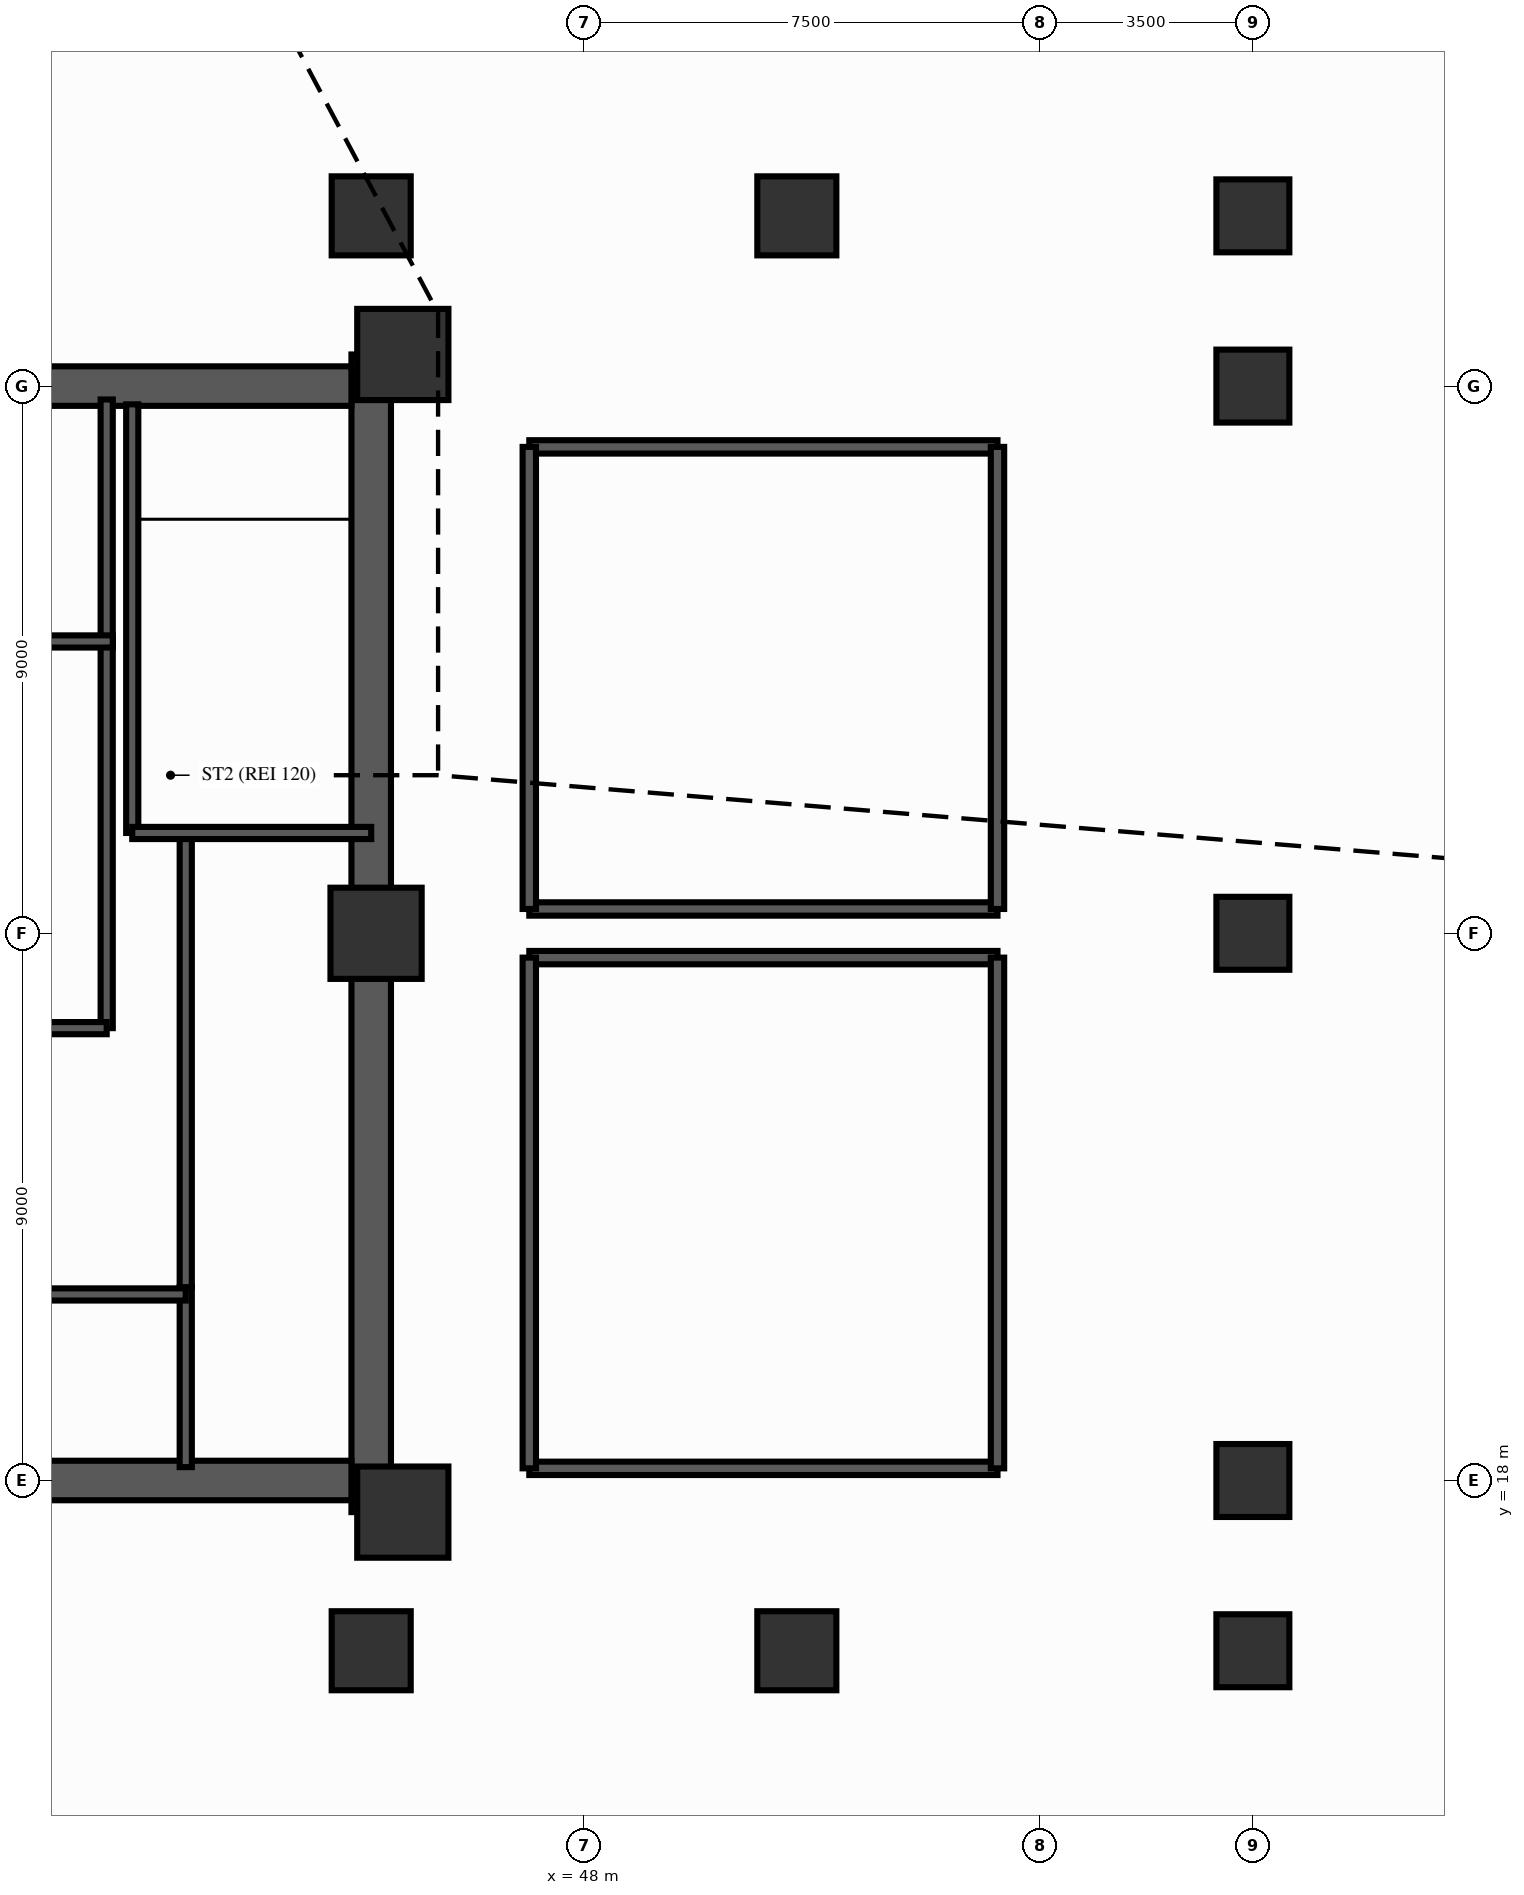
"""IFC4 building model, lengths in metres.
Left out: names, types, materials, properties, quantities, classifications, styles, units other than length and angle.
Written with IfcOpenShell. Run it as: python <this file> out.ifc"""

import sys

from ifc_helpers import new_model, si_unit, direction, frame, frame_2d, origin, origin_2d, place, context, subcontext, project, spatial, rectangle, extrude, source, transform, mapped, element, fill, save


model = new_model("IFC4")
c1 = context("Model", 3, precision=1e-05, world=origin(), true_north=direction((0.0, 1.0)))
c2 = subcontext(c1, "Body", "Model", "MODEL_VIEW")
j1 = project(units=[si_unit("LENGTHUNIT", "METRE"), si_unit("PLANEANGLEUNIT", "RADIAN")], contexts=[c1])
p1 = place(None, origin())
s1 = spatial("IfcSite", under=j1, at=p1, CompositionType="ELEMENT")
p2 = place(p1, origin())
s2 = spatial("IfcBuilding", under=s1, at=p2, CompositionType="ELEMENT")
p3 = place(p2, frame((0.0, 0.0, -9.2)))
s3 = spatial("IfcBuildingStorey", under=s2, at=p3, CompositionType="ELEMENT", Elevation=-9.2)
p4 = place(p3, frame((44.5, 17.48, 0.0), z_axis=(0.0, 0.0, 1.0), x_axis=(0.0, 1.0, 0.0)))
e1 = element("IfcWall", 1, at=p4, inside=s3, PredefinedType="SHEAR", context=c2, shape_type="SweptSolid", body=[
    extrude(rectangle(XDim=19.04, YDim=0.65, at=frame_2d((9.52, 0.0))), origin(), (0.0, 0.0, 1.0), 4.6),
])
p5 = place(p4, frame((12.67, 0.0, 0.0), z_axis=(0.0, 0.0, 1.0), x_axis=(-1.0, 0.0, 0.0)))
e2 = element("IfcOpeningElement", 2, at=p5, cuts=e1, PredefinedType="OPENING", context=c2, shape_type="SweptSolid", body=[
    extrude(rectangle(XDim=1.1, YDim=2.15, at=frame_2d((0.55, 1.075))), frame((0.0, 0.337, 0.0), z_axis=(0.0, -1.0, 0.0), x_axis=(1.0, 0.0, 0.0)), (0.0, 0.0, 1.0), 0.674),
])
p6 = place(p3, frame((31.825, 18.0, 0.0), z_axis=(0.0, 0.0, 1.0), x_axis=(1.0, 0.0, 0.0)))
e3 = element("IfcWall", 3, at=p6, inside=s3, PredefinedType="SHEAR", context=c2, shape_type="SweptSolid", body=[
    extrude(rectangle(XDim=12.35, YDim=0.65, at=frame_2d((6.175, 0.0))), origin(), (0.0, 0.0, 1.0), 4.6),
])
p7 = place(p3, frame((31.825, 36.0, 0.0), z_axis=(0.0, 0.0, 1.0), x_axis=(1.0, 0.0, 0.0)))
e4 = element("IfcWall", 4, at=p7, inside=s3, PredefinedType="SHEAR", context=c2, shape_type="SweptSolid", body=[
    extrude(rectangle(XDim=12.35, YDim=0.65, at=frame_2d((6.175, 0.0))), origin(), (0.0, 0.0, 1.0), 4.6),
])
p8 = place(p7, frame((5.125, 0.0, 0.0), z_axis=(0.0, 0.0, 1.0), x_axis=(-1.0, 0.0, 0.0)))
e5 = element("IfcOpeningElement", 5, at=p8, cuts=e4, PredefinedType="OPENING", context=c2, shape_type="SweptSolid", body=[
    extrude(rectangle(XDim=1.4, YDim=2.15, at=frame_2d((0.7, 1.075))), frame((0.0, 0.337, 0.0), z_axis=(0.0, -1.0, 0.0), x_axis=(1.0, 0.0, 0.0)), (0.0, 0.0, 1.0), 0.674),
])
m1 = source(origin(), c2, "Body", "SweptSolid", [
    extrude(rectangle(XDim=1.5, YDim=1.5, at=origin_2d()), origin(), (0.0, 0.0, 1.0), 4.6),
])
for number, where, z_axis, x_axis in (
    (6, (45.02, 17.48, 0.0), (0.0, 0.0, 1.0), (1.0, 0.0, 0.0)),
    (7, (45.02, 36.52, 0.0), (0.0, 0.0, 1.0), (1.0, 0.0, 0.0)),
    (8, (44.58, 27.0, 0.0), (0.0, 0.0, 1.0), (1.0, 0.0, 0.0)),
):
    element("IfcColumn", number, at=place(p3, frame(where, z_axis=z_axis, x_axis=x_axis)), inside=s3, PredefinedType="COLUMN", context=c2, shape_type="MappedRepresentation", body=[
        mapped(m1, transform((0.0, 0.0, 0.0), scale=1.0)),
    ])
m2 = source(origin(), c2, "Body", "SweptSolid", [
    extrude(rectangle(XDim=1.2, YDim=1.2, at=origin_2d()), origin(), (0.0, 0.0, 1.0), 4.6),
])
for number, where, z_axis, x_axis in (
    (9, (59.0, 15.2, 0.0), (0.0, 0.0, 1.0), (1.0, 0.0, 0.0)),
    (10, (59.0, 18.0, 0.0), (0.0, 0.0, 1.0), (1.0, 0.0, 0.0)),
    (11, (59.0, 27.0, 0.0), (0.0, 0.0, 1.0), (1.0, 0.0, 0.0)),
    (12, (59.0, 36.0, 0.0), (0.0, 0.0, 1.0), (1.0, 0.0, 0.0)),
    (13, (59.0, 38.8, 0.0), (0.0, 0.0, 1.0), (1.0, 0.0, 0.0)),
):
    element("IfcColumn", number, at=place(p3, frame(where, z_axis=z_axis, x_axis=x_axis)), inside=s3, PredefinedType="COLUMN", context=c2, shape_type="MappedRepresentation", body=[
        mapped(m2, transform((0.0, 0.0, 0.0), scale=1.0)),
    ])
m3 = source(origin(), c2, "Body", "SweptSolid", [
    extrude(rectangle(XDim=1.3, YDim=1.3, at=origin_2d()), origin(), (0.0, 0.0, 1.0), 4.6),
])
for number, where, z_axis, x_axis in (
    (14, (44.5, 15.2, 0.0), (0.0, 0.0, 1.0), (1.0, 0.0, 0.0)),
    (15, (44.5, 38.8, 0.0), (0.0, 0.0, 1.0), (1.0, 0.0, 0.0)),
    (16, (51.5, 15.2, 0.0), (0.0, 0.0, 1.0), (1.0, 0.0, 0.0)),
    (17, (51.5, 38.8, 0.0), (0.0, 0.0, 1.0), (1.0, 0.0, 0.0)),
):
    element("IfcColumn", number, at=place(p3, frame(where, z_axis=z_axis, x_axis=x_axis)), inside=s3, PredefinedType="COLUMN", context=c2, shape_type="MappedRepresentation", body=[
        mapped(m3, transform((0.0, 0.0, 0.0), scale=1.0)),
    ])
p9 = place(p3, frame((41.45, 18.22, 0.0), z_axis=(0.0, 0.0, 1.0), x_axis=(0.0, 1.0, 0.0)))
e18 = element("IfcWall", 18, at=p9, inside=s3, PredefinedType="PARTITIONING", context=c2, shape_type="SweptSolid", body=[
    extrude(rectangle(XDim=2.96, YDim=0.2, at=frame_2d((1.48, 0.0))), origin(), (0.0, 0.0, 1.0), 4.3),
])
p10 = place(p3, frame((41.45, 21.18, 0.0), z_axis=(0.0, 0.0, 1.0), x_axis=(0.0, 1.0, 0.0)))
e19 = element("IfcWall", 19, at=p10, inside=s3, PredefinedType="PARTITIONING", context=c2, shape_type="SweptSolid", body=[
    extrude(rectangle(XDim=7.42, YDim=0.2, at=frame_2d((3.71, 0.0))), origin(), (0.0, 0.0, 1.0), 4.3),
])
p11 = place(p10, frame((2.6, 0.0, 0.0)))
e20 = element("IfcOpeningElement", 20, at=p11, cuts=e19, PredefinedType="OPENING", context=c2, shape_type="SweptSolid", body=[
    extrude(rectangle(XDim=0.9, YDim=2.1, at=frame_2d((0.45, 1.05))), frame((0.0, 0.112, 0.0), z_axis=(0.0, -1.0, 0.0), x_axis=(1.0, 0.0, 0.0)), (0.0, 0.0, 1.0), 0.224),
])
p12 = place(p3, frame((40.15, 25.44, 0.0), z_axis=(0.0, 0.0, 1.0), x_axis=(0.0, 1.0, 0.0)))
e21 = element("IfcWall", 21, at=p12, inside=s3, PredefinedType="PARTITIONING", context=c2, shape_type="SweptSolid", body=[
    extrude(rectangle(XDim=6.36, YDim=0.2, at=frame_2d((3.18, 0.0))), origin(), (0.0, 0.0, 1.0), 4.3),
])
p13 = place(p3, frame((40.15, 31.8, 0.0), z_axis=(0.0, 0.0, 1.0), x_axis=(0.0, 1.0, 0.0)))
e22 = element("IfcWall", 22, at=p13, inside=s3, PredefinedType="PARTITIONING", context=c2, shape_type="SweptSolid", body=[
    extrude(rectangle(XDim=3.98, YDim=0.2, at=frame_2d((1.99, 0.0))), origin(), (0.0, 0.0, 1.0), 4.3),
])
p14 = place(p3, frame((35.43, 21.06, 0.0), z_axis=(0.0, 0.0, 1.0), x_axis=(1.0, 0.0, 0.0)))
e23 = element("IfcWall", 23, at=p14, inside=s3, PredefinedType="PARTITIONING", context=c2, shape_type="SweptSolid", body=[
    extrude(rectangle(XDim=6.02, YDim=0.2, at=frame_2d((3.01, 0.0))), origin(), (0.0, 0.0, 1.0), 4.3),
])
p15 = place(p14, frame((1.0, 0.0, 0.0)))
e24 = element("IfcOpeningElement", 24, at=p15, cuts=e23, PredefinedType="OPENING", context=c2, shape_type="SweptSolid", body=[
    extrude(rectangle(XDim=1.1, YDim=2.15, at=frame_2d((0.55, 1.075))), frame((0.0, 0.112, 0.0), z_axis=(0.0, -1.0, 0.0), x_axis=(1.0, 0.0, 0.0)), (0.0, 0.0, 1.0), 0.224),
])
p16 = place(p14, frame((2.95, 0.0, 0.0)))
e25 = element("IfcOpeningElement", 25, at=p16, cuts=e23, PredefinedType="OPENING", context=c2, shape_type="SweptSolid", body=[
    extrude(rectangle(XDim=1.1, YDim=2.15, at=frame_2d((0.55, 1.075))), frame((0.0, 0.112, 0.0), z_axis=(0.0, -1.0, 0.0), x_axis=(1.0, 0.0, 0.0)), (0.0, 0.0, 1.0), 0.224),
])
p17 = place(p14, frame((4.58, 0.0, 0.0)))
e26 = element("IfcOpeningElement", 26, at=p17, cuts=e23, PredefinedType="OPENING", context=c2, shape_type="SweptSolid", body=[
    extrude(rectangle(XDim=1.2, YDim=2.15, at=frame_2d((0.6, 1.075))), frame((0.0, 0.112, 0.0), z_axis=(0.0, -1.0, 0.0), x_axis=(1.0, 0.0, 0.0)), (0.0, 0.0, 1.0), 0.224),
])
p18 = place(p3, frame((35.43, 25.44, 0.0), z_axis=(0.0, 0.0, 1.0), x_axis=(1.0, 0.0, 0.0)))
e27 = element("IfcWall", 27, at=p18, inside=s3, PredefinedType="PARTITIONING", context=c2, shape_type="SweptSolid", body=[
    extrude(rectangle(XDim=4.72, YDim=0.2, at=frame_2d((2.36, 0.0))), origin(), (0.0, 0.0, 1.0), 4.3),
])
p19 = place(p18, frame((1.25, 0.0, 0.0)))
e28 = element("IfcOpeningElement", 28, at=p19, cuts=e27, PredefinedType="OPENING", context=c2, shape_type="SweptSolid", body=[
    extrude(rectangle(XDim=1.1, YDim=2.15, at=frame_2d((0.55, 1.075))), frame((0.0, 0.112, 0.0), z_axis=(0.0, -1.0, 0.0), x_axis=(1.0, 0.0, 0.0)), (0.0, 0.0, 1.0), 0.224),
])
p20 = place(p3, frame((40.57, 28.65, 0.0), z_axis=(0.0, 0.0, 1.0), x_axis=(0.0, 1.0, 0.0)))
e29 = element("IfcWall", 29, at=p20, inside=s3, PredefinedType="SOLIDWALL", context=c2, shape_type="SweptSolid", body=[
    extrude(rectangle(XDim=7.05, YDim=0.2, at=frame_2d((3.525, 0.0))), origin(), (0.0, 0.0, 1.0), 4.3),
])
p21 = place(p3, frame((40.57, 28.65, 0.0), z_axis=(0.0, 0.0, 1.0), x_axis=(1.0, 0.0, 0.0)))
e30 = element("IfcWall", 30, at=p21, inside=s3, PredefinedType="SOLIDWALL", context=c2, shape_type="SweptSolid", body=[
    extrude(rectangle(XDim=3.93, YDim=0.2, at=frame_2d((1.965, 0.0))), origin(), (0.0, 0.0, 1.0), 4.3),
])
p22 = place(p3, frame((37.9, 31.8, 0.0), z_axis=(0.0, 0.0, 1.0), x_axis=(1.0, 0.0, 0.0)))
e31 = element("IfcWall", 31, at=p22, inside=s3, PredefinedType="PARTITIONING", context=c2, shape_type="SweptSolid", body=[
    extrude(rectangle(XDim=2.35, YDim=0.2, at=frame_2d((1.175, 0.0))), origin(), (0.0, 0.0, 1.0), 4.3),
])
for number, where, z_axis, x_axis in (
    (32, (47.1, 18.2, 0.0), (0.0, 0.0, 1.0), (1.0, 0.0, 0.0)),
    (33, (47.1, 26.6, 0.0), (0.0, 0.0, 1.0), (1.0, 0.0, 0.0)),
):
    element("IfcWall", number, at=place(p3, frame(where, z_axis=z_axis, x_axis=x_axis)), inside=s3, PredefinedType="PARTITIONING", context=c2, shape_type="SweptSolid", body=[
        extrude(rectangle(XDim=7.7, YDim=0.22, at=frame_2d((3.85, 0.0))), origin(), (0.0, 0.0, 1.0), 4.3),
    ])
p23 = place(p3, frame((47.1, 18.2, 0.0), z_axis=(0.0, 0.0, 1.0), x_axis=(0.0, 1.0, 0.0)))
e34 = element("IfcWall", 34, at=p23, inside=s3, PredefinedType="PARTITIONING", context=c2, shape_type="SweptSolid", body=[
    extrude(rectangle(XDim=8.4, YDim=0.22, at=frame_2d((4.2, 0.0))), origin(), (0.0, 0.0, 1.0), 4.3),
])
p24 = place(p3, frame((54.8, 18.2, 0.0), z_axis=(0.0, 0.0, 1.0), x_axis=(0.0, 1.0, 0.0)))
e35 = element("IfcWall", 35, at=p24, inside=s3, PredefinedType="PARTITIONING", context=c2, shape_type="SweptSolid", body=[
    extrude(rectangle(XDim=8.4, YDim=0.22, at=frame_2d((4.2, 0.0))), origin(), (0.0, 0.0, 1.0), 4.3),
])
p25 = place(p24, frame((3.65, 0.0, 0.0)))
e36 = element("IfcOpeningElement", 36, at=p25, cuts=e35, PredefinedType="OPENING", context=c2, shape_type="SweptSolid", body=[
    extrude(rectangle(XDim=1.1, YDim=2.15, at=frame_2d((0.55, 1.075))), frame((0.0, 0.122, 0.0), z_axis=(0.0, -1.0, 0.0), x_axis=(1.0, 0.0, 0.0)), (0.0, 0.0, 1.0), 0.244),
])
for number, where, z_axis, x_axis in (
    (37, (47.1, 27.4, 0.0), (0.0, 0.0, 1.0), (1.0, 0.0, 0.0)),
    (38, (47.1, 35.0, 0.0), (0.0, 0.0, 1.0), (1.0, 0.0, 0.0)),
):
    element("IfcWall", number, at=place(p3, frame(where, z_axis=z_axis, x_axis=x_axis)), inside=s3, PredefinedType="PARTITIONING", context=c2, shape_type="SweptSolid", body=[
        extrude(rectangle(XDim=7.7, YDim=0.22, at=frame_2d((3.85, 0.0))), origin(), (0.0, 0.0, 1.0), 4.3),
    ])
p26 = place(p3, frame((47.1, 27.4, 0.0), z_axis=(0.0, 0.0, 1.0), x_axis=(0.0, 1.0, 0.0)))
e39 = element("IfcWall", 39, at=p26, inside=s3, PredefinedType="PARTITIONING", context=c2, shape_type="SweptSolid", body=[
    extrude(rectangle(XDim=7.6, YDim=0.22, at=frame_2d((3.8, 0.0))), origin(), (0.0, 0.0, 1.0), 4.3),
])
p27 = place(p3, frame((54.8, 27.4, 0.0), z_axis=(0.0, 0.0, 1.0), x_axis=(0.0, 1.0, 0.0)))
e40 = element("IfcWall", 40, at=p27, inside=s3, PredefinedType="PARTITIONING", context=c2, shape_type="SweptSolid", body=[
    extrude(rectangle(XDim=7.6, YDim=0.22, at=frame_2d((3.8, 0.0))), origin(), (0.0, 0.0, 1.0), 4.3),
])
p28 = place(p27, frame((3.25, 0.0, 0.0)))
e41 = element("IfcOpeningElement", 41, at=p28, cuts=e40, PredefinedType="OPENING", context=c2, shape_type="SweptSolid", body=[
    extrude(rectangle(XDim=1.1, YDim=2.15, at=frame_2d((0.55, 1.075))), frame((0.0, 0.122, 0.0), z_axis=(0.0, -1.0, 0.0), x_axis=(1.0, 0.0, 0.0)), (0.0, 0.0, 1.0), 0.244),
])
m4 = source(origin(), c2, "Body", "SweptSolid", [
    extrude(rectangle(XDim=1.1, YDim=2.15, at=frame_2d((0.55, 1.075))), frame((0.0, 0.025, 0.0), z_axis=(0.0, -1.0, 0.0), x_axis=(1.0, 0.0, 0.0)), (0.0, 0.0, 1.0), 0.05),
])
p29 = place(p5, origin())
e42 = element("IfcDoor", 42, at=p29, inside=s3, OperationType="SINGLE_SWING_RIGHT", PredefinedType="DOOR", context=c2, shape_type="MappedRepresentation", body=[
    mapped(m4, transform((0.0, 0.0, 0.0), scale=1.0)),
])
fill(e2, e42)
m5 = source(origin(), c2, "Body", "SweptSolid", [
    extrude(rectangle(XDim=0.9, YDim=2.1, at=frame_2d((0.45, 1.05))), frame((0.0, 0.025, 0.0), z_axis=(0.0, -1.0, 0.0), x_axis=(1.0, 0.0, 0.0)), (0.0, 0.0, 1.0), 0.05),
])
p30 = place(p11, origin())
e43 = element("IfcDoor", 43, at=p30, inside=s3, OperationType="SINGLE_SWING_LEFT", PredefinedType="DOOR", context=c2, shape_type="MappedRepresentation", body=[
    mapped(m5, transform((0.0, 0.0, 0.0), scale=1.0)),
])
fill(e20, e43)
p31 = place(p16, origin())
e44 = element("IfcDoor", 44, at=p31, inside=s3, OperationType="DOUBLE_DOOR_SLIDING", PredefinedType="DOOR", context=c2, shape_type="MappedRepresentation", body=[
    mapped(m4, transform((0.0, 0.0, 0.0), scale=1.0)),
])
fill(e25, e44)
m6 = source(origin(), c2, "Body", "SweptSolid", [
    extrude(rectangle(XDim=1.2, YDim=2.15, at=frame_2d((0.6, 1.075))), frame((0.0, 0.025, 0.0), z_axis=(0.0, -1.0, 0.0), x_axis=(1.0, 0.0, 0.0)), (0.0, 0.0, 1.0), 0.05),
])
p32 = place(p17, origin())
e45 = element("IfcDoor", 45, at=p32, inside=s3, OperationType="DOUBLE_DOOR_SLIDING", PredefinedType="DOOR", context=c2, shape_type="MappedRepresentation", body=[
    mapped(m6, transform((0.0, 0.0, 0.0), scale=1.0)),
])
fill(e26, e45)
p33 = place(p25, origin())
e46 = element("IfcDoor", 46, at=p33, inside=s3, OperationType="SINGLE_SWING_RIGHT", PredefinedType="DOOR", context=c2, shape_type="MappedRepresentation", body=[
    mapped(m4, transform((0.0, 0.0, 0.0), scale=1.0)),
])
fill(e36, e46)
p34 = place(p28, origin())
e47 = element("IfcDoor", 47, at=p34, inside=s3, OperationType="SINGLE_SWING_LEFT", PredefinedType="DOOR", context=c2, shape_type="MappedRepresentation", body=[
    mapped(m4, transform((0.0, 0.0, 0.0), scale=1.0)),
])
fill(e41, e47)
save(model, sys.argv[1])
